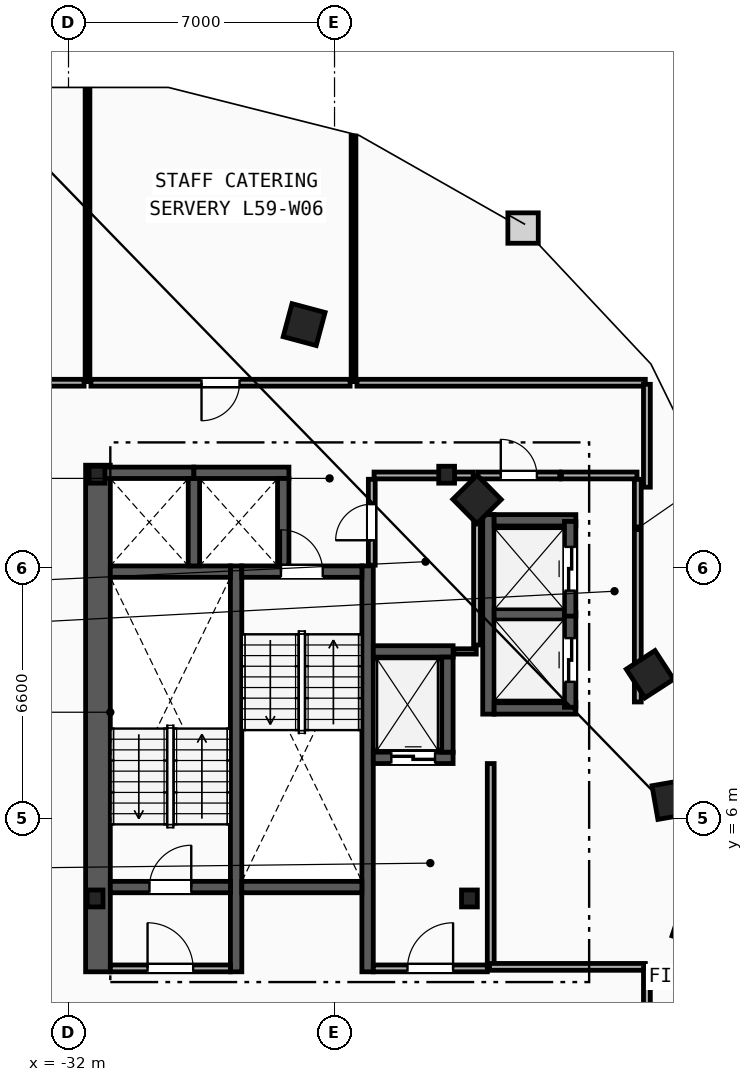
"""IFC4 building model, lengths in metres.
Left out: names, types, materials, properties, quantities, classifications, styles, units other than length and angle.
Written with IfcOpenShell. Run it as: python <this file> out.ifc"""

import sys

from ifc_helpers import new_model, si_unit, direction, frame, frame_2d, origin, origin_2d, place, context, subcontext, project, spatial, rectangle, i_section, extrude, element, fill, save


model = new_model("IFC4")
c1 = context("Model", 3, precision=1e-05, world=origin(), true_north=direction((0.0, 1.0)))
c2 = subcontext(c1, "Body", "Model", "MODEL_VIEW")
j1 = project(units=[si_unit("LENGTHUNIT", "METRE"), si_unit("PLANEANGLEUNIT", "RADIAN")], contexts=[c1])
p1 = place(None, origin())
s1 = spatial("IfcSite", under=j1, at=p1, CompositionType="ELEMENT")
p2 = place(p1, origin())
s2 = spatial("IfcBuilding", under=s1, at=p2, CompositionType="ELEMENT")
p3 = place(p2, frame((0.0, 0.0, 224.2)))
s3 = spatial("IfcBuildingStorey", under=s2, at=p3, CompositionType="ELEMENT", Elevation=224.2)
for number, where, z_axis, x_axis in (
    (1, (-31.3, 3.9, 0.0), (0.0, 0.0, 1.0), (1.0, 0.0, 0.0)),
    (2, (-21.45, 3.9, 0.0), (0.0, 0.0, 1.0), (1.0, 0.0, 0.0)),
    (3, (-22.05, 15.05, 0.0), (0.0, 0.0, 1.0), (1.0, 0.0, 0.0)),
    (4, (-31.25, 15.05, 0.0), (0.0, 0.0, 1.0), (1.0, 0.0, 0.0)),
):
    element("IfcColumn", number, at=place(p3, frame(where, z_axis=z_axis, x_axis=x_axis)), inside=s3, PredefinedType="COLUMN", context=c2, shape_type="SweptSolid", body=[
        extrude(i_section(OverallWidth=0.416, OverallDepth=0.446, WebThickness=0.039, FlangeThickness=0.063, FilletRadius=0.018, at=origin_2d()), origin(), (0.0, 0.0, 1.0), 3.6),
    ])
for number, where, z_axis, x_axis in (
    (5, (-15.55, 3.2, 0.0), (0.0, 0.0, 1.0), (0.315, 0.949, 0.0)),
    (6, (-16.125, 6.5, 0.0), (0.0, 0.0, 1.0), (-0.172, 0.985, 0.0)),
    (7, (-16.7, 9.8, 0.0), (0.0, 0.0, 1.0), (-0.544, 0.839, 0.0)),
    (8, (-21.25, 14.4, 0.0), (0.0, 0.0, 1.0), (-0.703, 0.711, 0.0)),
    (9, (-25.8, 19.0, 0.0), (0.0, 0.0, 1.0), (-0.966, 0.259, 0.0)),
):
    element("IfcColumn", number, at=place(p3, frame(where, z_axis=z_axis, x_axis=x_axis)), inside=s3, PredefinedType="COLUMN", context=c2, shape_type="SweptSolid", body=[
        extrude(rectangle(XDim=0.9, YDim=0.9, at=origin_2d()), origin(), (0.0, 0.0, 1.0), 3.6),
    ])
p4 = place(p3, frame((-31.225, 1.97, 0.0), z_axis=(0.0, 0.0, 1.0), x_axis=(0.0, 1.0, 0.0)))
e10 = element("IfcWall", 10, at=p4, inside=s3, PredefinedType="SHEAR", context=c2, shape_type="SweptSolid", body=[
    extrude(rectangle(XDim=13.33, YDim=0.65, at=frame_2d((6.665, 0.0))), origin(), (0.0, 0.0, 1.0), 3.34),
])
for number, where, z_axis, x_axis in (
    (11, (-27.59, 1.97, 0.0), (0.0, 0.0, 1.0), (0.0, 1.0, 0.0)),
    (12, (-24.13, 1.97, 0.0), (0.0, 0.0, 1.0), (0.0, 1.0, 0.0)),
):
    element("IfcWall", number, at=place(p3, frame(where, z_axis=z_axis, x_axis=x_axis)), inside=s3, PredefinedType="SHEAR", context=c2, shape_type="SweptSolid", body=[
        extrude(rectangle(XDim=10.68, YDim=0.3, at=frame_2d((5.34, 0.0))), origin(), (0.0, 0.0, 1.0), 3.34),
    ])
p5 = place(p3, frame((-30.9, 4.2, 0.0), z_axis=(0.0, 0.0, 1.0), x_axis=(1.0, 0.0, 0.0)))
e13 = element("IfcWall", 13, at=p5, inside=s3, PredefinedType="SHEAR", context=c2, shape_type="SweptSolid", body=[
    extrude(rectangle(XDim=3.16, YDim=0.3, at=frame_2d((1.58, 0.0))), origin(), (0.0, 0.0, 1.0), 3.34),
])
p6 = place(p5, frame((1.03, 0.0, 0.0)))
e14 = element("IfcOpeningElement", 14, at=p6, cuts=e13, PredefinedType="OPENING", context=c2, shape_type="SweptSolid", body=[
    extrude(rectangle(XDim=1.1, YDim=2.15, at=frame_2d((0.55, 1.075))), frame((0.0, 0.16, 0.0), z_axis=(0.0, -1.0, 0.0), x_axis=(1.0, 0.0, 0.0)), (0.0, 0.0, 1.0), 0.32),
])
p7 = place(p3, frame((-30.9, 12.5, 0.0), z_axis=(0.0, 0.0, 1.0), x_axis=(1.0, 0.0, 0.0)))
e15 = element("IfcWall", 15, at=p7, inside=s3, PredefinedType="SHEAR", context=c2, shape_type="SweptSolid", body=[
    extrude(rectangle(XDim=3.16, YDim=0.3, at=frame_2d((1.58, 0.0))), origin(), (0.0, 0.0, 1.0), 3.34),
])
p8 = place(p3, frame((-27.44, 12.5, 0.0), z_axis=(0.0, 0.0, 1.0), x_axis=(1.0, 0.0, 0.0)))
e16 = element("IfcWall", 16, at=p8, inside=s3, PredefinedType="SHEAR", context=c2, shape_type="SweptSolid", body=[
    extrude(rectangle(XDim=3.16, YDim=0.3, at=frame_2d((1.58, 0.0))), origin(), (0.0, 0.0, 1.0), 3.34),
])
p9 = place(p8, frame((1.03, 0.0, 0.0)))
e17 = element("IfcOpeningElement", 17, at=p9, cuts=e16, PredefinedType="OPENING", context=c2, shape_type="SweptSolid", body=[
    extrude(rectangle(XDim=1.1, YDim=2.15, at=frame_2d((0.55, 1.075))), frame((0.0, 0.16, 0.0), z_axis=(0.0, -1.0, 0.0), x_axis=(1.0, 0.0, 0.0)), (0.0, 0.0, 1.0), 0.32),
])
p10 = place(p3, frame((-27.44, 4.2, 0.0), z_axis=(0.0, 0.0, 1.0), x_axis=(1.0, 0.0, 0.0)))
e18 = element("IfcWall", 18, at=p10, inside=s3, PredefinedType="SHEAR", context=c2, shape_type="SweptSolid", body=[
    extrude(rectangle(XDim=3.16, YDim=0.3, at=frame_2d((1.58, 0.0))), origin(), (0.0, 0.0, 1.0), 3.34),
])
p11 = place(p3, frame((-20.89, 2.15, 0.0), z_axis=(0.0, 0.0, 1.0), x_axis=(0.0, 1.0, 0.0)))
e19 = element("IfcWall", 19, at=p11, inside=s3, PredefinedType="PARTITIONING", context=c2, shape_type="SweptSolid", body=[
    extrude(rectangle(XDim=5.3, YDim=0.18, at=frame_2d((2.65, 0.0))), origin(), (0.0, 0.0, 1.0), 3.34),
])
p12 = place(p3, frame((-23.98, 2.06, 0.0), z_axis=(0.0, 0.0, 1.0), x_axis=(1.0, 0.0, 0.0)))
e20 = element("IfcWall", 20, at=p12, inside=s3, PredefinedType="PARTITIONING", context=c2, shape_type="SweptSolid", body=[
    extrude(rectangle(XDim=3.0, YDim=0.18, at=frame_2d((1.5, 0.0))), origin(), (0.0, 0.0, 1.0), 3.34),
])
p13 = place(p12, frame((0.9, 0.0, 0.0)))
e21 = element("IfcOpeningElement", 21, at=p13, cuts=e20, PredefinedType="OPENING", context=c2, shape_type="SweptSolid", body=[
    extrude(rectangle(XDim=1.2, YDim=2.15, at=frame_2d((0.6, 1.075))), frame((0.0, 0.1, 0.0), z_axis=(0.0, -1.0, 0.0), x_axis=(1.0, 0.0, 0.0)), (0.0, 0.0, 1.0), 0.2),
])
p14 = place(p3, frame((-30.9, 2.06, 0.0), z_axis=(0.0, 0.0, 1.0), x_axis=(1.0, 0.0, 0.0)))
e22 = element("IfcWall", 22, at=p14, inside=s3, PredefinedType="PARTITIONING", context=c2, shape_type="SweptSolid", body=[
    extrude(rectangle(XDim=3.16, YDim=0.18, at=frame_2d((1.58, 0.0))), origin(), (0.0, 0.0, 1.0), 3.34),
])
p15 = place(p14, frame((0.98, 0.0, 0.0)))
e23 = element("IfcOpeningElement", 23, at=p15, cuts=e22, PredefinedType="OPENING", context=c2, shape_type="SweptSolid", body=[
    extrude(rectangle(XDim=1.2, YDim=2.15, at=frame_2d((0.6, 1.075))), frame((0.0, 0.1, 0.0), z_axis=(0.0, -1.0, 0.0), x_axis=(1.0, 0.0, 0.0)), (0.0, 0.0, 1.0), 0.2),
])
p16 = place(p3, frame((-23.98, 7.6, 0.0), z_axis=(0.0, 0.0, 1.0), x_axis=(1.0, 0.0, 0.0)))
e24 = element("IfcWall", 24, at=p16, inside=s3, PredefinedType="SHEAR", context=c2, shape_type="SweptSolid", body=[
    extrude(rectangle(XDim=2.1, YDim=0.3, at=frame_2d((1.05, 0.0))), origin(), (0.0, 0.0, 1.0), 3.34),
])
p17 = place(p16, frame((0.475, 0.0, 0.0)))
e25 = element("IfcOpeningElement", 25, at=p17, cuts=e24, PredefinedType="OPENING", context=c2, shape_type="SweptSolid", body=[
    extrude(rectangle(XDim=1.15, YDim=2.2, at=frame_2d((0.575, 1.1))), frame((0.0, 0.16, 0.0), z_axis=(0.0, -1.0, 0.0), x_axis=(1.0, 0.0, 0.0)), (0.0, 0.0, 1.0), 0.32),
])
p18 = place(p3, frame((-23.98, 10.4, 0.0), z_axis=(0.0, 0.0, 1.0), x_axis=(1.0, 0.0, 0.0)))
e26 = element("IfcWall", 26, at=p18, inside=s3, PredefinedType="SHEAR", context=c2, shape_type="SweptSolid", body=[
    extrude(rectangle(XDim=2.1, YDim=0.3, at=frame_2d((1.05, 0.0))), origin(), (0.0, 0.0, 1.0), 3.34),
])
for number, where, z_axis, x_axis in (
    (27, (-22.03, 7.75, 0.0), (0.0, 0.0, 1.0), (0.0, 1.0, 0.0)),
    (28, (-31.2, 15.1, 0.0), (0.0, 0.0, 1.0), (1.0, 0.0, 0.0)),
):
    element("IfcWall", number, at=place(p3, frame(where, z_axis=z_axis, x_axis=x_axis)), inside=s3, PredefinedType="SHEAR", context=c2, shape_type="SweptSolid", body=[
        extrude(rectangle(XDim=2.5, YDim=0.3, at=frame_2d((1.25, 0.0))), origin(), (0.0, 0.0, 1.0), 3.34),
    ])
p19 = place(p3, frame((-28.7, 12.65, 0.0), z_axis=(0.0, 0.0, 1.0), x_axis=(0.0, 1.0, 0.0)))
e29 = element("IfcWall", 29, at=p19, inside=s3, PredefinedType="SHEAR", context=c2, shape_type="SweptSolid", body=[
    extrude(rectangle(XDim=2.3, YDim=0.3, at=frame_2d((1.15, 0.0))), origin(), (0.0, 0.0, 1.0), 3.34),
])
p20 = place(p3, frame((-28.7, 15.1, 0.0), z_axis=(0.0, 0.0, 1.0), x_axis=(1.0, 0.0, 0.0)))
e30 = element("IfcWall", 30, at=p20, inside=s3, PredefinedType="SHEAR", context=c2, shape_type="SweptSolid", body=[
    extrude(rectangle(XDim=2.5, YDim=0.3, at=frame_2d((1.25, 0.0))), origin(), (0.0, 0.0, 1.0), 3.34),
])
p21 = place(p3, frame((-26.35, 12.65, 0.0), z_axis=(0.0, 0.0, 1.0), x_axis=(0.0, 1.0, 0.0)))
e31 = element("IfcWall", 31, at=p21, inside=s3, PredefinedType="SHEAR", context=c2, shape_type="SweptSolid", body=[
    extrude(rectangle(XDim=2.3, YDim=0.3, at=frame_2d((1.15, 0.0))), origin(), (0.0, 0.0, 1.0), 3.34),
])
p22 = place(p3, frame((-20.95, 8.75, 0.0), z_axis=(0.0, 0.0, 1.0), x_axis=(0.0, 1.0, 0.0)))
e32 = element("IfcWall", 32, at=p22, inside=s3, PredefinedType="SHEAR", context=c2, shape_type="SweptSolid", body=[
    extrude(rectangle(XDim=5.25, YDim=0.3, at=frame_2d((2.625, 0.0))), origin(), (0.0, 0.0, 1.0), 3.34),
])
for number, where, z_axis, x_axis in (
    (33, (-20.8, 8.9, 0.0), (0.0, 0.0, 1.0), (1.0, 0.0, 0.0)),
    (34, (-20.8, 13.85, 0.0), (0.0, 0.0, 1.0), (1.0, 0.0, 0.0)),
):
    element("IfcWall", number, at=place(p3, frame(where, z_axis=z_axis, x_axis=x_axis)), inside=s3, PredefinedType="SHEAR", context=c2, shape_type="SweptSolid", body=[
        extrude(rectangle(XDim=2.15, YDim=0.3, at=frame_2d((1.075, 0.0))), origin(), (0.0, 0.0, 1.0), 3.34),
    ])
p23 = place(p3, frame((-20.8, 11.375, 0.0), z_axis=(0.0, 0.0, 1.0), x_axis=(1.0, 0.0, 0.0)))
e35 = element("IfcWall", 35, at=p23, inside=s3, PredefinedType="SHEAR", context=c2, shape_type="SweptSolid", body=[
    extrude(rectangle(XDim=1.85, YDim=0.3, at=frame_2d((0.925, 0.0))), origin(), (0.0, 0.0, 1.0), 3.34),
])
p24 = place(p3, frame((-18.8, 8.93, 0.0), z_axis=(0.0, 0.0, 1.0), x_axis=(0.0, 1.0, 0.0)))
e36 = element("IfcWall", 36, at=p24, inside=s3, PredefinedType="SHEAR", context=c2, shape_type="SweptSolid", body=[
    extrude(rectangle(XDim=2.49, YDim=0.3, at=frame_2d((1.245, 0.0))), origin(), (0.0, 0.0, 1.0), 3.34),
])
p25 = place(p24, frame((0.67, 0.0, 0.0)))
e37 = element("IfcOpeningElement", 37, at=p25, cuts=e36, PredefinedType="OPENING", context=c2, shape_type="SweptSolid", body=[
    extrude(rectangle(XDim=1.15, YDim=2.2, at=frame_2d((0.575, 1.1))), frame((0.0, 0.16, 0.0), z_axis=(0.0, -1.0, 0.0), x_axis=(1.0, 0.0, 0.0)), (0.0, 0.0, 1.0), 0.32),
])
p26 = place(p3, frame((-18.8, 11.33, 0.0), z_axis=(0.0, 0.0, 1.0), x_axis=(0.0, 1.0, 0.0)))
e38 = element("IfcWall", 38, at=p26, inside=s3, PredefinedType="SHEAR", context=c2, shape_type="SweptSolid", body=[
    extrude(rectangle(XDim=2.49, YDim=0.3, at=frame_2d((1.245, 0.0))), origin(), (0.0, 0.0, 1.0), 3.34),
])
p27 = place(p26, frame((0.67, 0.0, 0.0)))
e39 = element("IfcOpeningElement", 39, at=p27, cuts=e38, PredefinedType="OPENING", context=c2, shape_type="SweptSolid", body=[
    extrude(rectangle(XDim=1.15, YDim=2.2, at=frame_2d((0.575, 1.1))), frame((0.0, 0.16, 0.0), z_axis=(0.0, -1.0, 0.0), x_axis=(1.0, 0.0, 0.0)), (0.0, 0.0, 1.0), 0.32),
])
p28 = place(p3, frame((-17.02, 9.07, 0.0), z_axis=(0.0, 0.0, 1.0), x_axis=(0.0, 1.0, 0.0)))
e40 = element("IfcWall", 40, at=p28, inside=s3, PredefinedType="PARTITIONING", context=c2, shape_type="SweptSolid", body=[
    extrude(rectangle(XDim=5.86, YDim=0.18, at=frame_2d((2.93, 0.0))), origin(), (0.0, 0.0, 1.0), 3.34),
])
p29 = place(p3, frame((-21.23, 15.03, 0.0), z_axis=(0.0, 0.0, 1.0), x_axis=(1.0, 0.0, 0.0)))
e41 = element("IfcWall", 41, at=p29, inside=s3, PredefinedType="PARTITIONING", context=c2, shape_type="SweptSolid", body=[
    extrude(rectangle(XDim=2.16, YDim=0.18, at=frame_2d((1.08, 0.0))), origin(), (0.0, 0.0, 1.0), 3.34),
])
p30 = place(p29, frame((0.605, 0.0, 0.0)))
e42 = element("IfcOpeningElement", 42, at=p30, cuts=e41, PredefinedType="OPENING", context=c2, shape_type="SweptSolid", body=[
    extrude(rectangle(XDim=0.95, YDim=2.1, at=frame_2d((0.475, 1.05))), frame((0.0, 0.1, 0.0), z_axis=(0.0, -1.0, 0.0), x_axis=(1.0, 0.0, 0.0)), (0.0, 0.0, 1.0), 0.2),
])
p31 = place(p3, frame((-19.03, 15.03, 0.0), z_axis=(0.0, 0.0, 1.0), x_axis=(1.0, 0.0, 0.0)))
e43 = element("IfcWall", 43, at=p31, inside=s3, PredefinedType="PARTITIONING", context=c2, shape_type="SweptSolid", body=[
    extrude(rectangle(XDim=1.99, YDim=0.18, at=frame_2d((0.995, 0.0))), origin(), (0.0, 0.0, 1.0), 3.34),
])
p32 = place(p3, frame((-21.86, 10.4, 0.0), z_axis=(0.0, 0.0, 1.0), x_axis=(1.0, 0.0, 0.0)))
e44 = element("IfcWall", 44, at=p32, inside=s3, PredefinedType="PARTITIONING", context=c2, shape_type="SweptSolid", body=[
    extrude(rectangle(XDim=0.59, YDim=0.14, at=frame_2d((0.295, 0.0))), origin(), (0.0, 0.0, 1.0), 3.34),
])
p33 = place(p3, frame((-21.25, 10.57, 0.0), z_axis=(0.0, 0.0, 1.0), x_axis=(0.0, 1.0, 0.0)))
e45 = element("IfcWall", 45, at=p33, inside=s3, PredefinedType="PARTITIONING", context=c2, shape_type="SweptSolid", body=[
    extrude(rectangle(XDim=4.36, YDim=0.18, at=frame_2d((2.18, 0.0))), origin(), (0.0, 0.0, 1.0), 3.34),
])
p34 = place(p3, frame((-23.96, 15.03, 0.0), z_axis=(0.0, 0.0, 1.0), x_axis=(1.0, 0.0, 0.0)))
e46 = element("IfcWall", 46, at=p34, inside=s3, PredefinedType="PARTITIONING", context=c2, shape_type="SweptSolid", body=[
    extrude(rectangle(XDim=2.61, YDim=0.18, at=frame_2d((1.305, 0.0))), origin(), (0.0, 0.0, 1.0), 2.413),
])
p35 = place(p3, frame((-24.02, 12.67, 0.0), z_axis=(0.0, 0.0, 1.0), x_axis=(0.0, 1.0, 0.0)))
e47 = element("IfcWall", 47, at=p35, inside=s3, PredefinedType="PARTITIONING", context=c2, shape_type="SweptSolid", body=[
    extrude(rectangle(XDim=2.26, YDim=0.18, at=frame_2d((1.13, 0.0))), origin(), (0.0, 0.0, 1.0), 3.34),
])
p36 = place(p35, frame((0.655, 0.0, 0.0)))
e48 = element("IfcOpeningElement", 48, at=p36, cuts=e47, PredefinedType="OPENING", context=c2, shape_type="SweptSolid", body=[
    extrude(rectangle(XDim=0.95, YDim=2.1, at=frame_2d((0.475, 1.05))), frame((0.0, 0.1, 0.0), z_axis=(0.0, -1.0, 0.0), x_axis=(1.0, 0.0, 0.0)), (0.0, 0.0, 1.0), 0.2),
])
p37 = place(p3, frame((-31.5, 17.5, 0.0), z_axis=(0.0, 0.0, 1.0), x_axis=(0.0, 1.0, 0.0)))
e49 = element("IfcWall", 49, at=p37, inside=s3, PredefinedType="PARTITIONING", context=c2, shape_type="SweptSolid", body=[
    extrude(rectangle(XDim=7.69, YDim=0.125, at=frame_2d((3.845, 0.0))), origin(), (0.0, 0.0, 1.0), 3.34),
])
p38 = place(p3, frame((-24.5, 17.5, 0.0), z_axis=(0.0, 0.0, 1.0), x_axis=(0.0, 1.0, 0.0)))
e50 = element("IfcWall", 50, at=p38, inside=s3, PredefinedType="PARTITIONING", context=c2, shape_type="SweptSolid", body=[
    extrude(rectangle(XDim=6.463, YDim=0.125, at=frame_2d((3.231, 0.0))), origin(), (0.0, 0.0, 1.0), 3.34),
])
p39 = place(p3, frame((-16.822, 17.47, 0.0), z_axis=(0.0, 0.0, 1.0), x_axis=(-1.0, 0.0, 0.0)))
e51 = element("IfcWall", 51, at=p39, inside=s3, PredefinedType="PARTITIONING", context=c2, shape_type="SweptSolid", body=[
    extrude(rectangle(XDim=7.588, YDim=0.18, at=frame_2d((3.794, 0.0))), origin(), (0.0, 0.0, 1.0), 3.34),
])
p40 = place(p3, frame((-16.822, 2.1, 0.0), z_axis=(0.0, 0.0, 1.0), x_axis=(-1.0, 0.0, 0.0)))
e52 = element("IfcWall", 52, at=p40, inside=s3, PredefinedType="PARTITIONING", context=c2, shape_type="SweptSolid", body=[
    extrude(rectangle(XDim=4.098, YDim=0.18, at=frame_2d((2.049, 0.0))), origin(), (0.0, 0.0, 1.0), 3.34),
])
p41 = place(p3, frame((-16.78, 14.721, 0.0), z_axis=(0.0, 0.0, 1.0), x_axis=(0.0, 1.0, 0.0)))
e53 = element("IfcWall", 53, at=p41, inside=s3, PredefinedType="PARTITIONING", context=c2, shape_type="SweptSolid", body=[
    extrude(rectangle(XDim=2.707, YDim=0.18, at=frame_2d((1.354, 0.0))), origin(), (0.0, 0.0, 1.0), 3.34),
])
p42 = place(p3, frame((-16.78, -0.329, 0.0), z_axis=(0.0, 0.0, 1.0), x_axis=(0.0, 1.0, 0.0)))
e54 = element("IfcWall", 54, at=p42, inside=s3, PredefinedType="PARTITIONING", context=c2, shape_type="SweptSolid", body=[
    extrude(rectangle(XDim=2.387, YDim=0.18, at=frame_2d((1.194, 0.0))), origin(), (0.0, 0.0, 1.0), 3.34),
])
p43 = place(p3, frame((-31.59, 17.47, 0.0), z_axis=(0.0, 0.0, 1.0), x_axis=(-1.0, 0.0, 0.0)))
e55 = element("IfcWall", 55, at=p43, inside=s3, PredefinedType="PARTITIONING", context=c2, shape_type="SweptSolid", body=[
    extrude(rectangle(XDim=2.038, YDim=0.18, at=frame_2d((1.019, 0.0))), origin(), (0.0, 0.0, 1.0), 3.34),
])
p44 = place(p3, frame((-24.59, 17.47, 0.0), z_axis=(0.0, 0.0, 1.0), x_axis=(-1.0, 0.0, 0.0)))
e56 = element("IfcWall", 56, at=p44, inside=s3, PredefinedType="PARTITIONING", context=c2, shape_type="SweptSolid", body=[
    extrude(rectangle(XDim=6.82, YDim=0.18, at=frame_2d((3.41, 0.0))), origin(), (0.0, 0.0, 1.0), 3.34),
])
p45 = place(p44, frame((2.91, 0.0, 0.0)))
e57 = element("IfcOpeningElement", 57, at=p45, cuts=e56, PredefinedType="OPENING", context=c2, shape_type="SweptSolid", body=[
    extrude(rectangle(XDim=1.0, YDim=2.15, at=frame_2d((0.5, 1.075))), frame((0.0, 0.1, 0.0), z_axis=(0.0, -1.0, 0.0), x_axis=(1.0, 0.0, 0.0)), (0.0, 0.0, 1.0), 0.2),
])
p46 = place(p6, origin())
e58 = element("IfcDoor", 58, at=p46, inside=s3, OperationType="SINGLE_SWING_RIGHT", PredefinedType="DOOR", context=c2, shape_type="SweptSolid", body=[
    extrude(rectangle(XDim=1.1, YDim=2.15, at=frame_2d((0.55, 1.075))), frame((0.0, 0.025, 0.0), z_axis=(0.0, -1.0, 0.0), x_axis=(1.0, 0.0, 0.0)), (0.0, 0.0, 1.0), 0.05),
])
fill(e14, e58)
p47 = place(p9, origin())
e59 = element("IfcDoor", 59, at=p47, inside=s3, OperationType="SINGLE_SWING_LEFT", PredefinedType="DOOR", context=c2, shape_type="SweptSolid", body=[
    extrude(rectangle(XDim=1.1, YDim=2.15, at=frame_2d((0.55, 1.075))), frame((0.0, 0.025, 0.0), z_axis=(0.0, -1.0, 0.0), x_axis=(1.0, 0.0, 0.0)), (0.0, 0.0, 1.0), 0.05),
])
fill(e17, e59)
p48 = place(p13, origin())
e60 = element("IfcDoor", 60, at=p48, inside=s3, OperationType="SINGLE_SWING_RIGHT", PredefinedType="DOOR", context=c2, shape_type="SweptSolid", body=[
    extrude(rectangle(XDim=1.2, YDim=2.15, at=frame_2d((0.6, 1.075))), frame((0.0, 0.025, 0.0), z_axis=(0.0, -1.0, 0.0), x_axis=(1.0, 0.0, 0.0)), (0.0, 0.0, 1.0), 0.05),
])
fill(e21, e60)
p49 = place(p15, origin())
e61 = element("IfcDoor", 61, at=p49, inside=s3, OperationType="SINGLE_SWING_LEFT", PredefinedType="DOOR", context=c2, shape_type="SweptSolid", body=[
    extrude(rectangle(XDim=1.2, YDim=2.15, at=frame_2d((0.6, 1.075))), frame((0.0, 0.025, 0.0), z_axis=(0.0, -1.0, 0.0), x_axis=(1.0, 0.0, 0.0)), (0.0, 0.0, 1.0), 0.05),
])
fill(e23, e61)
p50 = place(p17, origin())
e62 = element("IfcDoor", 62, at=p50, inside=s3, OperationType="SLIDING_TO_LEFT", PredefinedType="TRAPDOOR", context=c2, shape_type="SweptSolid", body=[
    extrude(rectangle(XDim=1.15, YDim=2.2, at=frame_2d((0.575, 1.1))), frame((0.0, 0.025, 0.0), z_axis=(0.0, -1.0, 0.0), x_axis=(1.0, 0.0, 0.0)), (0.0, 0.0, 1.0), 0.05),
])
fill(e25, e62)
p51 = place(p25, origin())
e63 = element("IfcDoor", 63, at=p51, inside=s3, OperationType="SLIDING_TO_LEFT", PredefinedType="TRAPDOOR", context=c2, shape_type="SweptSolid", body=[
    extrude(rectangle(XDim=1.15, YDim=2.2, at=frame_2d((0.575, 1.1))), frame((0.0, 0.025, 0.0), z_axis=(0.0, -1.0, 0.0), x_axis=(1.0, 0.0, 0.0)), (0.0, 0.0, 1.0), 0.05),
])
fill(e37, e63)
p52 = place(p27, origin())
e64 = element("IfcDoor", 64, at=p52, inside=s3, OperationType="SLIDING_TO_LEFT", PredefinedType="TRAPDOOR", context=c2, shape_type="SweptSolid", body=[
    extrude(rectangle(XDim=1.15, YDim=2.2, at=frame_2d((0.575, 1.1))), frame((0.0, 0.025, 0.0), z_axis=(0.0, -1.0, 0.0), x_axis=(1.0, 0.0, 0.0)), (0.0, 0.0, 1.0), 0.05),
])
fill(e39, e64)
p53 = place(p45, origin())
e65 = element("IfcDoor", 65, at=p53, inside=s3, OperationType="SINGLE_SWING_RIGHT", PredefinedType="DOOR", context=c2, shape_type="SweptSolid", body=[
    extrude(rectangle(XDim=1.0, YDim=2.15, at=frame_2d((0.5, 1.075))), frame((0.0, 0.025, 0.0), z_axis=(0.0, -1.0, 0.0), x_axis=(1.0, 0.0, 0.0)), (0.0, 0.0, 1.0), 0.05),
])
fill(e57, e65)
p54 = place(p36, origin())
e66 = element("IfcDoor", 66, at=p54, inside=s3, OperationType="SINGLE_SWING_LEFT", PredefinedType="DOOR", context=c2, shape_type="SweptSolid", body=[
    extrude(rectangle(XDim=0.95, YDim=2.1, at=frame_2d((0.475, 1.05))), frame((0.0, 0.025, 0.0), z_axis=(0.0, -1.0, 0.0), x_axis=(1.0, 0.0, 0.0)), (0.0, 0.0, 1.0), 0.05),
])
fill(e48, e66)
p55 = place(p30, origin())
e67 = element("IfcDoor", 67, at=p55, inside=s3, OperationType="SINGLE_SWING_LEFT", PredefinedType="DOOR", context=c2, shape_type="SweptSolid", body=[
    extrude(rectangle(XDim=0.95, YDim=2.1, at=frame_2d((0.475, 1.05))), frame((0.0, 0.025, 0.0), z_axis=(0.0, -1.0, 0.0), x_axis=(1.0, 0.0, 0.0)), (0.0, 0.0, 1.0), 0.05),
])
fill(e42, e67)
save(model, sys.argv[1])
